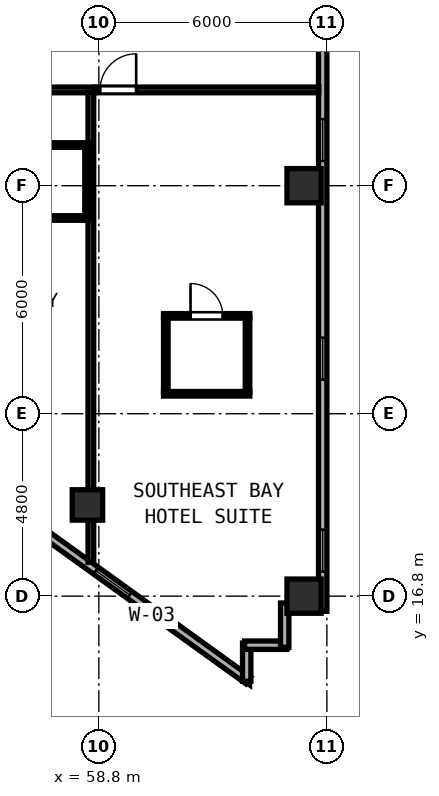
"""IFC4 building model, lengths in metres.
Left out: names, types, materials, properties, quantities, classifications, styles, units other than length and angle.
Written with IfcOpenShell. Run it as: python <this file> out.ifc"""

import sys

from ifc_helpers import new_model, si_unit, direction, frame, frame_2d, origin, origin_2d, place, context, subcontext, project, spatial, rectangle, hollow_rectangle, extrude, element, fill, save


model = new_model("IFC4")
c1 = context("Model", 3, precision=1e-05, world=origin(), true_north=direction((0.0, 1.0)))
c2 = subcontext(c1, "Body", "Model", "MODEL_VIEW")
j1 = project(units=[si_unit("LENGTHUNIT", "METRE"), si_unit("PLANEANGLEUNIT", "RADIAN")], contexts=[c1])
p1 = place(None, origin())
s1 = spatial("IfcSite", under=j1, at=p1, CompositionType="ELEMENT")
p2 = place(p1, origin())
s2 = spatial("IfcBuilding", under=s1, at=p2, CompositionType="ELEMENT")
p3 = place(p2, frame((0.0, 0.0, 169.0)))
s3 = spatial("IfcBuildingStorey", under=s2, at=p3, CompositionType="ELEMENT", Elevation=169.0)
for number, where, z_axis, x_axis in (
    (1, (64.2, 16.8, 0.0), (0.0, 0.0, 1.0), (1.0, 0.0, 0.0)),
    (2, (64.2, 27.6, 0.0), (0.0, 0.0, 1.0), (1.0, 0.0, 0.0)),
):
    element("IfcColumn", number, at=place(p3, frame(where, z_axis=z_axis, x_axis=x_axis)), inside=s3, PredefinedType="COLUMN", context=c2, shape_type="SweptSolid", body=[
        extrude(hollow_rectangle(XDim=0.9, YDim=0.9, WallThickness=0.034, at=origin_2d()), origin(), (0.0, 0.0, 1.0), 3.8),
    ])
p4 = place(p3, frame((58.5, 19.2, 0.0), z_axis=(0.0, 0.0, 1.0), x_axis=(1.0, 0.0, 0.0)))
e3 = element("IfcColumn", 3, at=p4, inside=s3, PredefinedType="COLUMN", context=c2, shape_type="SweptSolid", body=[
    extrude(hollow_rectangle(XDim=0.8, YDim=0.8, WallThickness=0.03, at=origin_2d()), origin(), (0.0, 0.0, 1.0), 3.8),
])
p5 = place(p3, frame((53.242, 21.417, 0.0), z_axis=(0.0, 0.0, 1.0), x_axis=(0.811534737332, -0.58430417601, 0.0)))
e4 = element("IfcWall", 4, at=p5, inside=s3, PredefinedType="SOLIDWALL", context=c2, shape_type="SweptSolid", body=[
    extrude(rectangle(XDim=11.697, YDim=0.22, at=frame_2d((5.849, 0.0))), origin(), (0.0, 0.0, 1.0), 3.215),
])
p6 = place(p5, frame((0.7, 0.0, 0.85)))
e5 = element("IfcOpeningElement", 5, at=p6, cuts=e4, PredefinedType="OPENING", context=c2, shape_type="SweptSolid", body=[
    extrude(rectangle(XDim=1.1, YDim=1.75, at=frame_2d((0.55, 0.875))), frame((0.0, 0.12, 0.0), z_axis=(0.0, -1.0, 0.0), x_axis=(1.0, 0.0, 0.0)), (0.0, 0.0, 1.0), 0.24),
])
p7 = place(p5, frame((6.752, 0.0, 0.85)))
e6 = element("IfcOpeningElement", 6, at=p7, cuts=e4, PredefinedType="OPENING", context=c2, shape_type="SweptSolid", body=[
    extrude(rectangle(XDim=1.1, YDim=1.75, at=frame_2d((0.55, 0.875))), frame((0.0, 0.12, 0.0), z_axis=(0.0, -1.0, 0.0), x_axis=(1.0, 0.0, 0.0)), (0.0, 0.0, 1.0), 0.24),
])
p8 = place(p3, frame((62.69, 14.56, 0.0), z_axis=(0.0, 0.0, 1.0), x_axis=(0.0, 1.0, 0.0)))
e7 = element("IfcWall", 7, at=p8, inside=s3, PredefinedType="SOLIDWALL", context=c2, shape_type="SweptSolid", body=[
    extrude(rectangle(XDim=1.005, YDim=0.22, at=frame_2d((0.502, 0.0))), origin(), (0.0, 0.0, 1.0), 3.62),
])
p9 = place(p3, frame((62.635, 15.51, 0.0), z_axis=(0.0, 0.0, 1.0), x_axis=(1.0, 0.0, 0.0)))
e8 = element("IfcWall", 8, at=p9, inside=s3, PredefinedType="SOLIDWALL", context=c2, shape_type="SweptSolid", body=[
    extrude(rectangle(XDim=1.11, YDim=0.22, at=frame_2d((0.555, 0.0))), origin(), (0.0, 0.0, 1.0), 3.62),
])
p10 = place(p3, frame((63.69, 15.455, 0.0), z_axis=(0.0, 0.0, 1.0), x_axis=(0.0, 1.0, 0.0)))
e9 = element("IfcWall", 9, at=p10, inside=s3, PredefinedType="SOLIDWALL", context=c2, shape_type="SweptSolid", body=[
    extrude(rectangle(XDim=1.165, YDim=0.22, at=frame_2d((0.583, 0.0))), origin(), (0.0, 0.0, 1.0), 3.62),
])
p11 = place(p3, frame((64.69, 16.4, 0.0), z_axis=(0.0, 0.0, 1.0), x_axis=(0.0, 1.0, 0.0)))
e10 = element("IfcWall", 10, at=p11, inside=s3, PredefinedType="SOLIDWALL", context=c2, shape_type="SweptSolid", body=[
    extrude(rectangle(XDim=21.145, YDim=0.22, at=frame_2d((10.573, 0.0))), origin(), (0.0, 0.0, 1.0), 3.62),
])
p12 = place(p11, frame((1.05, 0.0, 0.85)))
e11 = element("IfcOpeningElement", 11, at=p12, cuts=e10, PredefinedType="OPENING", context=c2, shape_type="SweptSolid", body=[
    extrude(rectangle(XDim=1.1, YDim=1.75, at=frame_2d((0.55, 0.875))), frame((0.0, 0.12, 0.0), z_axis=(0.0, -1.0, 0.0), x_axis=(1.0, 0.0, 0.0)), (0.0, 0.0, 1.0), 0.24),
])
p13 = place(p11, frame((6.1, 0.0, 0.85)))
e12 = element("IfcOpeningElement", 12, at=p13, cuts=e10, PredefinedType="OPENING", context=c2, shape_type="SweptSolid", body=[
    extrude(rectangle(XDim=1.1, YDim=1.75, at=frame_2d((0.55, 0.875))), frame((0.0, 0.12, 0.0), z_axis=(0.0, -1.0, 0.0), x_axis=(1.0, 0.0, 0.0)), (0.0, 0.0, 1.0), 0.24),
])
p14 = place(p11, frame((11.85, 0.0, 0.85)))
e13 = element("IfcOpeningElement", 13, at=p14, cuts=e10, PredefinedType="OPENING", context=c2, shape_type="SweptSolid", body=[
    extrude(rectangle(XDim=1.1, YDim=1.75, at=frame_2d((0.55, 0.875))), frame((0.0, 0.12, 0.0), z_axis=(0.0, -1.0, 0.0), x_axis=(1.0, 0.0, 0.0)), (0.0, 0.0, 1.0), 0.24),
])
p15 = place(p11, frame((16.9, 0.0, 0.85)))
e14 = element("IfcOpeningElement", 14, at=p15, cuts=e10, PredefinedType="OPENING", context=c2, shape_type="SweptSolid", body=[
    extrude(rectangle(XDim=1.1, YDim=1.75, at=frame_2d((0.55, 0.875))), frame((0.0, 0.12, 0.0), z_axis=(0.0, -1.0, 0.0), x_axis=(1.0, 0.0, 0.0)), (0.0, 0.0, 1.0), 0.24),
])
p16 = place(p3, frame((52.882, 30.12, 0.0), z_axis=(0.0, 0.0, 1.0), x_axis=(1.0, 0.0, 0.0)))
e15 = element("IfcWall", 15, at=p16, inside=s3, PredefinedType="PARTITIONING", context=c2, shape_type="SweptSolid", body=[
    extrude(rectangle(XDim=5.808, YDim=0.15, at=frame_2d((2.904, 0.0))), origin(), (0.0, 0.0, 1.0), 3.62),
])
p17 = place(p16, frame((4.291, 0.0, 0.0), z_axis=(0.0, 0.0, 1.0), x_axis=(-1.0, 0.0, 0.0)))
e16 = element("IfcOpeningElement", 16, at=p17, cuts=e15, PredefinedType="OPENING", context=c2, shape_type="SweptSolid", body=[
    extrude(rectangle(XDim=0.95, YDim=2.15, at=frame_2d((0.475, 1.075))), frame((0.0, 0.085, 0.0), z_axis=(0.0, -1.0, 0.0), x_axis=(1.0, 0.0, 0.0)), (0.0, 0.0, 1.0), 0.17),
])
p18 = place(p3, frame((58.59, 17.692, 0.0), z_axis=(0.0, 0.0, 1.0), x_axis=(0.0, 1.0, 0.0)))
e17 = element("IfcWall", 17, at=p18, inside=s3, PredefinedType="PARTITIONING", context=c2, shape_type="SweptSolid", body=[
    extrude(rectangle(XDim=12.368, YDim=0.15, at=frame_2d((6.184, 0.0))), origin(), (0.0, 0.0, 1.0), 3.62),
])
for number, where, z_axis, x_axis in (
    (18, (56.45, 28.67, 0.0), (0.0, 0.0, 1.0), (1.0, 0.0, 0.0)),
    (19, (56.45, 26.75, 0.0), (0.0, 0.0, 1.0), (1.0, 0.0, 0.0)),
):
    element("IfcWall", number, at=place(p3, frame(where, z_axis=z_axis, x_axis=x_axis)), inside=s3, PredefinedType="PARTITIONING", context=c2, shape_type="SweptSolid", body=[
        extrude(rectangle(XDim=2.08, YDim=0.12, at=frame_2d((1.04, 0.0))), origin(), (0.0, 0.0, 1.0), 3.62),
    ])
p19 = place(p3, frame((58.49, 26.795, 0.0), z_axis=(0.0, 0.0, 1.0), x_axis=(0.0, 1.0, 0.0)))
e20 = element("IfcWall", 20, at=p19, inside=s3, PredefinedType="PARTITIONING", context=c2, shape_type="SweptSolid", body=[
    extrude(rectangle(XDim=1.83, YDim=0.12, at=frame_2d((0.915, 0.0))), origin(), (0.0, 0.0, 1.0), 3.62),
])
p20 = place(p3, frame((58.692, 30.12, 0.0), z_axis=(0.0, 0.0, 1.0), x_axis=(1.0, 0.0, 0.0)))
e21 = element("IfcWall", 21, at=p20, inside=s3, PredefinedType="PARTITIONING", context=c2, shape_type="SweptSolid", body=[
    extrude(rectangle(XDim=5.896, YDim=0.15, at=frame_2d((2.948, 0.0))), origin(), (0.0, 0.0, 1.0), 3.62),
])
p21 = place(p20, frame((1.09, 0.0, 0.0), z_axis=(0.0, 0.0, 1.0), x_axis=(-1.0, 0.0, 0.0)))
e22 = element("IfcOpeningElement", 22, at=p21, cuts=e21, PredefinedType="OPENING", context=c2, shape_type="SweptSolid", body=[
    extrude(rectangle(XDim=0.95, YDim=2.18, at=frame_2d((0.475, 1.09))), frame((0.0, 0.085, 0.0), z_axis=(0.0, -1.0, 0.0), x_axis=(1.0, 0.0, 0.0)), (0.0, 0.0, 1.0), 0.17),
])
p22 = place(p3, frame((60.502, 24.175, 0.0), z_axis=(0.0, 0.0, 1.0), x_axis=(1.0, 0.0, 0.0)))
e23 = element("IfcWall", 23, at=p22, inside=s3, PredefinedType="PARTITIONING", context=c2, shape_type="SweptSolid", body=[
    extrude(rectangle(XDim=2.27, YDim=0.12, at=frame_2d((1.135, 0.0))), origin(), (0.0, 0.0, 1.0), 3.62),
])
p23 = place(p22, frame((1.56, 0.0, 0.0), z_axis=(0.0, 0.0, 1.0), x_axis=(-1.0, 0.0, 0.0)))
e24 = element("IfcOpeningElement", 24, at=p23, cuts=e23, PredefinedType="OPENING", context=c2, shape_type="SweptSolid", body=[
    extrude(rectangle(XDim=0.85, YDim=2.1, at=frame_2d((0.425, 1.05))), frame((0.0, 0.07, 0.0), z_axis=(0.0, -1.0, 0.0), x_axis=(1.0, 0.0, 0.0)), (0.0, 0.0, 1.0), 0.14),
])
p24 = place(p3, frame((60.502, 22.125, 0.0), z_axis=(0.0, 0.0, 1.0), x_axis=(1.0, 0.0, 0.0)))
e25 = element("IfcWall", 25, at=p24, inside=s3, PredefinedType="PARTITIONING", context=c2, shape_type="SweptSolid", body=[
    extrude(rectangle(XDim=2.27, YDim=0.12, at=frame_2d((1.135, 0.0))), origin(), (0.0, 0.0, 1.0), 3.62),
])
for number, where, z_axis, x_axis in (
    (26, (60.562, 22.17, 0.0), (0.0, 0.0, 1.0), (0.0, 1.0, 0.0)),
    (27, (62.712, 22.17, 0.0), (0.0, 0.0, 1.0), (0.0, 1.0, 0.0)),
):
    element("IfcWall", number, at=place(p3, frame(where, z_axis=z_axis, x_axis=x_axis)), inside=s3, PredefinedType="PARTITIONING", context=c2, shape_type="SweptSolid", body=[
        extrude(rectangle(XDim=1.96, YDim=0.12, at=frame_2d((0.98, 0.0))), origin(), (0.0, 0.0, 1.0), 3.62),
    ])
p25 = place(p7, origin())
e28 = element("IfcWindow", 28, at=p25, inside=s3, PartitioningType="SINGLE_PANEL", PredefinedType="WINDOW", context=c2, shape_type="SweptSolid", body=[
    extrude(rectangle(XDim=1.1, YDim=1.75, at=frame_2d((0.55, 0.875))), frame((0.0, 0.03, 0.0), z_axis=(0.0, -1.0, 0.0), x_axis=(1.0, 0.0, 0.0)), (0.0, 0.0, 1.0), 0.06),
])
fill(e6, e28)
p26 = place(p12, origin())
e29 = element("IfcWindow", 29, at=p26, inside=s3, PartitioningType="SINGLE_PANEL", PredefinedType="WINDOW", context=c2, shape_type="SweptSolid", body=[
    extrude(rectangle(XDim=1.1, YDim=1.75, at=frame_2d((0.55, 0.875))), frame((0.0, 0.03, 0.0), z_axis=(0.0, -1.0, 0.0), x_axis=(1.0, 0.0, 0.0)), (0.0, 0.0, 1.0), 0.06),
])
fill(e11, e29)
p27 = place(p13, origin())
e30 = element("IfcWindow", 30, at=p27, inside=s3, PartitioningType="SINGLE_PANEL", PredefinedType="WINDOW", context=c2, shape_type="SweptSolid", body=[
    extrude(rectangle(XDim=1.1, YDim=1.75, at=frame_2d((0.55, 0.875))), frame((0.0, 0.03, 0.0), z_axis=(0.0, -1.0, 0.0), x_axis=(1.0, 0.0, 0.0)), (0.0, 0.0, 1.0), 0.06),
])
fill(e12, e30)
p28 = place(p14, origin())
e31 = element("IfcWindow", 31, at=p28, inside=s3, PartitioningType="SINGLE_PANEL", PredefinedType="WINDOW", context=c2, shape_type="SweptSolid", body=[
    extrude(rectangle(XDim=1.1, YDim=1.75, at=frame_2d((0.55, 0.875))), frame((0.0, 0.03, 0.0), z_axis=(0.0, -1.0, 0.0), x_axis=(1.0, 0.0, 0.0)), (0.0, 0.0, 1.0), 0.06),
])
fill(e13, e31)
p29 = place(p21, origin())
e32 = element("IfcDoor", 32, at=p29, inside=s3, OperationType="SINGLE_SWING_LEFT", PredefinedType="DOOR", context=c2, shape_type="SweptSolid", body=[
    extrude(rectangle(XDim=0.95, YDim=2.18, at=frame_2d((0.475, 1.09))), frame((0.0, 0.025, 0.0), z_axis=(0.0, -1.0, 0.0), x_axis=(1.0, 0.0, 0.0)), (0.0, 0.0, 1.0), 0.05),
])
fill(e22, e32)
p30 = place(p23, origin())
e33 = element("IfcDoor", 33, at=p30, inside=s3, OperationType="SINGLE_SWING_RIGHT", PredefinedType="DOOR", context=c2, shape_type="SweptSolid", body=[
    extrude(rectangle(XDim=0.85, YDim=2.1, at=frame_2d((0.425, 1.05))), frame((0.0, 0.025, 0.0), z_axis=(0.0, -1.0, 0.0), x_axis=(1.0, 0.0, 0.0)), (0.0, 0.0, 1.0), 0.05),
])
fill(e24, e33)
save(model, sys.argv[1])
